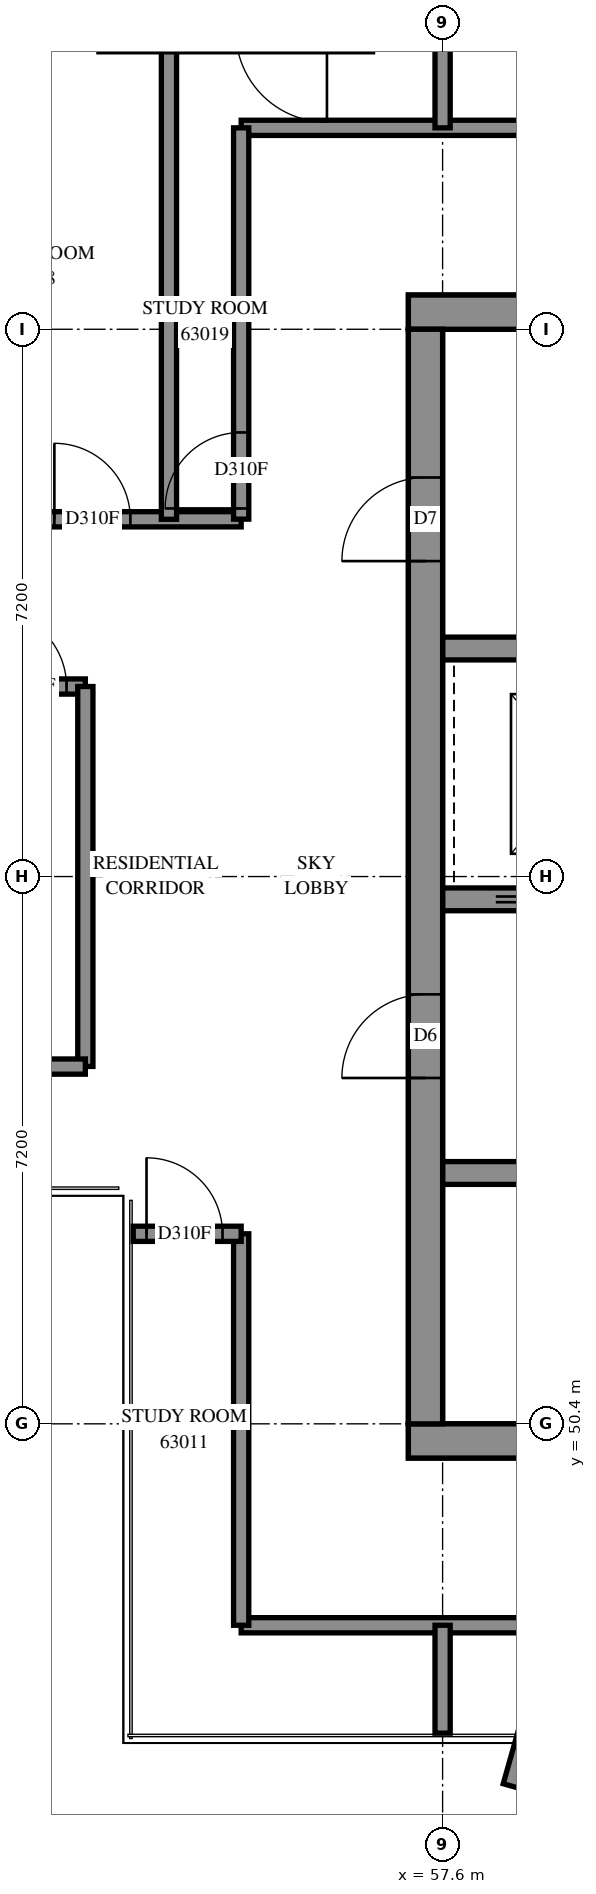
"""IFC4 building model, lengths in metres.
Left out: names, types, materials, properties, quantities, classifications, styles, units other than length and angle.
Written with IfcOpenShell. Run it as: python <this file> out.ifc"""

import sys

from ifc_helpers import new_model, si_unit, direction, frame, frame_2d, origin, place, context, subcontext, project, spatial, rectangle, extrude, element, fill, save


model = new_model("IFC4")
c1 = context("Model", 3, precision=1e-05, world=origin(), true_north=direction((0.0, 1.0)))
c2 = subcontext(c1, "Body", "Model", "MODEL_VIEW")
j1 = project(units=[si_unit("LENGTHUNIT", "METRE"), si_unit("PLANEANGLEUNIT", "RADIAN")], contexts=[c1])
p1 = place(None, origin())
s1 = spatial("IfcSite", under=j1, at=p1, CompositionType="ELEMENT")
p2 = place(p1, origin())
s2 = spatial("IfcBuilding", under=s1, at=p2, CompositionType="ELEMENT")
p3 = place(p2, frame((0.0, 0.0, 230.4)))
s3 = spatial("IfcBuildingStorey", under=s2, at=p3, CompositionType="ELEMENT", Elevation=230.4)
p4 = place(p3, frame((57.15, 50.175, -0.3), z_axis=(0.0, 0.0, 1.0), x_axis=(1.0, 0.0, 0.0)))
e1 = element("IfcWall", 1, at=p4, inside=s3, PredefinedType="SHEAR", context=c2, shape_type="SweptSolid", body=[
    extrude(rectangle(XDim=15.3, YDim=0.45, at=frame_2d((7.65, 0.0))), origin(), (0.0, 0.0, 1.0), 3.5),
])
p5 = place(p3, frame((57.15, 65.025, -0.3), z_axis=(0.0, 0.0, 1.0), x_axis=(1.0, 0.0, 0.0)))
e2 = element("IfcWall", 2, at=p5, inside=s3, PredefinedType="SHEAR", context=c2, shape_type="SweptSolid", body=[
    extrude(rectangle(XDim=15.3, YDim=0.45, at=frame_2d((7.65, 0.0))), origin(), (0.0, 0.0, 1.0), 3.5),
])
p6 = place(p5, frame((10.45, 0.0, 0.3)))
e3 = element("IfcOpeningElement", 3, at=p6, cuts=e2, PredefinedType="OPENING", context=c2, shape_type="SweptSolid", body=[
    extrude(rectangle(XDim=0.8, YDim=2.1, at=frame_2d((0.4, 1.05))), frame((0.0, 0.235, 0.0), z_axis=(0.0, -1.0, 0.0), x_axis=(1.0, 0.0, 0.0)), (0.0, 0.0, 1.0), 0.47),
])
p7 = place(p3, frame((57.375, 50.4, -0.3), z_axis=(0.0, 0.0, 1.0), x_axis=(0.0, 1.0, 0.0)))
e4 = element("IfcWall", 4, at=p7, inside=s3, PredefinedType="SHEAR", context=c2, shape_type="SweptSolid", body=[
    extrude(rectangle(XDim=14.4, YDim=0.45, at=frame_2d((7.2, 0.0))), origin(), (0.0, 0.0, 1.0), 3.5),
])
p8 = place(p7, frame((4.55, 0.0, 0.3)))
e5 = element("IfcOpeningElement", 5, at=p8, cuts=e4, PredefinedType="OPENING", context=c2, shape_type="SweptSolid", body=[
    extrude(rectangle(XDim=1.1, YDim=2.1, at=frame_2d((0.55, 1.05))), frame((0.0, 0.235, 0.0), z_axis=(0.0, -1.0, 0.0), x_axis=(1.0, 0.0, 0.0)), (0.0, 0.0, 1.0), 0.47),
])
p9 = place(p7, frame((11.35, 0.0, 0.3)))
e6 = element("IfcOpeningElement", 6, at=p9, cuts=e4, PredefinedType="OPENING", context=c2, shape_type="SweptSolid", body=[
    extrude(rectangle(XDim=1.1, YDim=2.1, at=frame_2d((0.55, 1.05))), frame((0.0, 0.235, 0.0), z_axis=(0.0, -1.0, 0.0), x_axis=(1.0, 0.0, 0.0)), (0.0, 0.0, 1.0), 0.47),
])
p10 = place(p3, frame((57.6, 53.7, 0.0), z_axis=(0.0, 0.0, 1.0), x_axis=(1.0, 0.0, 0.0)))
e7 = element("IfcWall", 7, at=p10, inside=s3, PredefinedType="SOLIDWALL", context=c2, shape_type="SweptSolid", body=[
    extrude(rectangle(XDim=14.4, YDim=0.3, at=frame_2d((7.2, 0.0))), origin(), (0.0, 0.0, 1.0), 3.9),
])
p11 = place(p10, frame((1.35, 0.0, 0.0)))
e8 = element("IfcOpeningElement", 8, at=p11, cuts=e7, PredefinedType="OPENING", context=c2, shape_type="SweptSolid", body=[
    extrude(rectangle(XDim=0.9, YDim=2.1, at=frame_2d((0.45, 1.05))), frame((0.0, 0.16, 0.0), z_axis=(0.0, -1.0, 0.0), x_axis=(1.0, 0.0, 0.0)), (0.0, 0.0, 1.0), 0.32),
])
p12 = place(p10, frame((4.95, 0.0, 0.0)))
e9 = element("IfcOpeningElement", 9, at=p12, cuts=e7, PredefinedType="OPENING", context=c2, shape_type="SweptSolid", body=[
    extrude(rectangle(XDim=0.9, YDim=2.1, at=frame_2d((0.45, 1.05))), frame((0.0, 0.16, 0.0), z_axis=(0.0, -1.0, 0.0), x_axis=(1.0, 0.0, 0.0)), (0.0, 0.0, 1.0), 0.32),
])
p13 = place(p10, frame((8.55, 0.0, 0.0)))
e10 = element("IfcOpeningElement", 10, at=p13, cuts=e7, PredefinedType="OPENING", context=c2, shape_type="SweptSolid", body=[
    extrude(rectangle(XDim=0.9, YDim=2.1, at=frame_2d((0.45, 1.05))), frame((0.0, 0.16, 0.0), z_axis=(0.0, -1.0, 0.0), x_axis=(1.0, 0.0, 0.0)), (0.0, 0.0, 1.0), 0.32),
])
p14 = place(p10, frame((12.05, 0.0, 0.0)))
e11 = element("IfcOpeningElement", 11, at=p14, cuts=e7, PredefinedType="OPENING", context=c2, shape_type="SweptSolid", body=[
    extrude(rectangle(XDim=1.1, YDim=2.1, at=frame_2d((0.55, 1.05))), frame((0.0, 0.16, 0.0), z_axis=(0.0, -1.0, 0.0), x_axis=(1.0, 0.0, 0.0)), (0.0, 0.0, 1.0), 0.32),
])
p15 = place(p3, frame((57.6, 57.3, 0.0), z_axis=(0.0, 0.0, 1.0), x_axis=(1.0, 0.0, 0.0)))
e12 = element("IfcWall", 12, at=p15, inside=s3, PredefinedType="SOLIDWALL", context=c2, shape_type="SweptSolid", body=[
    extrude(rectangle(XDim=14.4, YDim=0.3, at=frame_2d((7.2, 0.0))), origin(), (0.0, 0.0, 1.0), 3.9),
])
p16 = place(p15, frame((1.25, 0.0, 0.0)))
e13 = element("IfcOpeningElement", 13, at=p16, cuts=e12, PredefinedType="OPENING", context=c2, shape_type="SweptSolid", body=[
    extrude(rectangle(XDim=1.1, YDim=2.1, at=frame_2d((0.55, 1.05))), frame((0.0, 0.16, 0.0), z_axis=(0.0, -1.0, 0.0), x_axis=(1.0, 0.0, 0.0)), (0.0, 0.0, 1.0), 0.32),
])
p17 = place(p15, frame((4.85, 0.0, 0.0)))
e14 = element("IfcOpeningElement", 14, at=p17, cuts=e12, PredefinedType="OPENING", context=c2, shape_type="SweptSolid", body=[
    extrude(rectangle(XDim=1.1, YDim=2.1, at=frame_2d((0.55, 1.05))), frame((0.0, 0.16, 0.0), z_axis=(0.0, -1.0, 0.0), x_axis=(1.0, 0.0, 0.0)), (0.0, 0.0, 1.0), 0.32),
])
p18 = place(p15, frame((8.45, 0.0, 0.0)))
e15 = element("IfcOpeningElement", 15, at=p18, cuts=e12, PredefinedType="OPENING", context=c2, shape_type="SweptSolid", body=[
    extrude(rectangle(XDim=1.1, YDim=2.1, at=frame_2d((0.55, 1.05))), frame((0.0, 0.16, 0.0), z_axis=(0.0, -1.0, 0.0), x_axis=(1.0, 0.0, 0.0)), (0.0, 0.0, 1.0), 0.32),
])
p19 = place(p15, frame((12.05, 0.0, 0.0)))
e16 = element("IfcOpeningElement", 16, at=p19, cuts=e12, PredefinedType="OPENING", context=c2, shape_type="SweptSolid", body=[
    extrude(rectangle(XDim=1.1, YDim=2.1, at=frame_2d((0.55, 1.05))), frame((0.0, 0.16, 0.0), z_axis=(0.0, -1.0, 0.0), x_axis=(1.0, 0.0, 0.0)), (0.0, 0.0, 1.0), 0.32),
])
p20 = place(p3, frame((57.6, 60.6, 0.0), z_axis=(0.0, 0.0, 1.0), x_axis=(1.0, 0.0, 0.0)))
e17 = element("IfcWall", 17, at=p20, inside=s3, PredefinedType="SOLIDWALL", context=c2, shape_type="SweptSolid", body=[
    extrude(rectangle(XDim=7.2, YDim=0.3, at=frame_2d((3.6, 0.0))), origin(), (0.0, 0.0, 1.0), 3.9),
])
p21 = place(p3, frame((56.678, 68.725, 0.0), z_axis=(0.0, 0.0, 1.0), x_axis=(-1.0, 0.0, 0.0)))
e18 = element("IfcWall", 18, at=p21, inside=s3, PredefinedType="SOLIDWALL", context=c2, shape_type="SweptSolid", body=[
    extrude(rectangle(XDim=3.6, YDim=0.55, at=frame_2d((1.8, 0.0))), origin(), (0.0, 0.0, 1.0), 3.9),
])
p22 = place(p21, frame((0.6, 0.0, 0.0)))
e19 = element("IfcOpeningElement", 19, at=p22, cuts=e18, PredefinedType="OPENING", context=c2, shape_type="SweptSolid", body=[
    extrude(rectangle(XDim=1.2, YDim=2.4, at=frame_2d((0.6, 1.2))), frame((0.0, 0.285, 0.0), z_axis=(0.0, -1.0, 0.0), x_axis=(1.0, 0.0, 0.0)), (0.0, 0.0, 1.0), 0.57),
])
p23 = place(p3, frame((62.802, 44.835, 0.0), z_axis=(0.0, 0.0, 1.0), x_axis=(-0.962266055, 0.2721103442, 0.0)))
e20 = element("IfcWall", 20, at=p23, inside=s3, PredefinedType="SOLIDWALL", context=c2, shape_type="SweptSolid", body=[
    extrude(rectangle(XDim=4.464, YDim=0.8, at=frame_2d((2.232, 0.0))), origin(), (0.0, 0.0, 1.0), 0.65),
])
p24 = place(p3, frame((54.95, 67.45, 0.0), z_axis=(0.0, 0.0, 1.0), x_axis=(1.0, 0.0, 0.0)))
e21 = element("IfcWall", 21, at=p24, inside=s3, PredefinedType="PARTITIONING", context=c2, shape_type="SweptSolid", body=[
    extrude(rectangle(XDim=19.7, YDim=0.2, at=frame_2d((9.85, 0.0))), origin(), (0.0, 0.0, 1.0), 3.9),
])
p25 = place(p24, frame((6.513, 0.0, 0.0)))
e22 = element("IfcOpeningElement", 22, at=p25, cuts=e21, PredefinedType="OPENING", context=c2, shape_type="SweptSolid", body=[
    extrude(rectangle(XDim=1.0, YDim=2.1, at=frame_2d((0.5, 1.05))), frame((0.0, 0.11, 0.0), z_axis=(0.0, -1.0, 0.0), x_axis=(1.0, 0.0, 0.0)), (0.0, 0.0, 1.0), 0.22),
])
p26 = place(p24, frame((13.713, 0.0, 0.0)))
e23 = element("IfcOpeningElement", 23, at=p26, cuts=e21, PredefinedType="OPENING", context=c2, shape_type="SweptSolid", body=[
    extrude(rectangle(XDim=1.0, YDim=2.1, at=frame_2d((0.5, 1.05))), frame((0.0, 0.11, 0.0), z_axis=(0.0, -1.0, 0.0), x_axis=(1.0, 0.0, 0.0)), (0.0, 0.0, 1.0), 0.22),
])
p27 = place(p3, frame((54.95, 47.75, 0.0), z_axis=(0.0, 0.0, 1.0), x_axis=(1.0, 0.0, 0.0)))
e24 = element("IfcWall", 24, at=p27, inside=s3, PredefinedType="PARTITIONING", context=c2, shape_type="SweptSolid", body=[
    extrude(rectangle(XDim=19.296, YDim=0.2, at=frame_2d((9.648, 0.0))), origin(), (0.0, 0.0, 1.0), 3.9),
])
p28 = place(p27, frame((11.997, 0.0, 0.0)))
e25 = element("IfcOpeningElement", 25, at=p28, cuts=e24, PredefinedType="OPENING", context=c2, shape_type="SweptSolid", body=[
    extrude(rectangle(XDim=1.0, YDim=2.1, at=frame_2d((0.5, 1.05))), frame((0.0, 0.11, 0.0), z_axis=(0.0, -1.0, 0.0), x_axis=(1.0, 0.0, 0.0)), (0.0, 0.0, 1.0), 0.22),
])
p29 = place(p3, frame((40.702, 62.3, 0.0), z_axis=(0.0, 0.0, 1.0), x_axis=(1.0, 0.0, 0.0)))
e26 = element("IfcWall", 26, at=p29, inside=s3, PredefinedType="PARTITIONING", context=c2, shape_type="SweptSolid", body=[
    extrude(rectangle(XDim=14.248, YDim=0.2, at=frame_2d((7.124, 0.0))), origin(), (0.0, 0.0, 1.0), 3.9),
])
p30 = place(p29, frame((6.361, 0.0, 0.0)))
e27 = element("IfcOpeningElement", 27, at=p30, cuts=e26, PredefinedType="OPENING", context=c2, shape_type="SweptSolid", body=[
    extrude(rectangle(XDim=1.0, YDim=2.1, at=frame_2d((0.5, 1.05))), frame((0.0, 0.11, 0.0), z_axis=(0.0, -1.0, 0.0), x_axis=(1.0, 0.0, 0.0)), (0.0, 0.0, 1.0), 0.22),
])
p31 = place(p29, frame((11.79, 0.0, 0.0)))
e28 = element("IfcOpeningElement", 28, at=p31, cuts=e26, PredefinedType="OPENING", context=c2, shape_type="SweptSolid", body=[
    extrude(rectangle(XDim=1.0, YDim=2.1, at=frame_2d((0.5, 1.05))), frame((0.0, 0.11, 0.0), z_axis=(0.0, -1.0, 0.0), x_axis=(1.0, 0.0, 0.0)), (0.0, 0.0, 1.0), 0.22),
])
p32 = place(p3, frame((54.0, 62.3, 0.0), z_axis=(0.0, 0.0, 1.0), x_axis=(0.0, 1.0, 0.0)))
e29 = element("IfcWall", 29, at=p32, inside=s3, PredefinedType="PARTITIONING", context=c2, shape_type="SweptSolid", body=[
    extrude(rectangle(XDim=6.15, YDim=0.2, at=frame_2d((3.075, 0.0))), origin(), (0.0, 0.0, 1.0), 3.9),
])
p33 = place(p3, frame((46.33, 60.1, 0.0), z_axis=(0.0, 0.0, 1.0), x_axis=(1.0, 0.0, 0.0)))
e30 = element("IfcWall", 30, at=p33, inside=s3, PredefinedType="PARTITIONING", context=c2, shape_type="SweptSolid", body=[
    extrude(rectangle(XDim=6.57, YDim=0.2, at=frame_2d((3.285, 0.0))), origin(), (0.0, 0.0, 1.0), 3.9),
])
p34 = place(p33, frame((0.924, 0.0, 0.0)))
e31 = element("IfcOpeningElement", 31, at=p34, cuts=e30, PredefinedType="OPENING", context=c2, shape_type="SweptSolid", body=[
    extrude(rectangle(XDim=1.0, YDim=2.1, at=frame_2d((0.5, 1.05))), frame((0.0, 0.11, 0.0), z_axis=(0.0, -1.0, 0.0), x_axis=(1.0, 0.0, 0.0)), (0.0, 0.0, 1.0), 0.22),
])
p35 = place(p33, frame((5.322, 0.0, 0.0)))
e32 = element("IfcOpeningElement", 32, at=p35, cuts=e30, PredefinedType="OPENING", context=c2, shape_type="SweptSolid", body=[
    extrude(rectangle(XDim=1.0, YDim=2.1, at=frame_2d((0.5, 1.05))), frame((0.0, 0.11, 0.0), z_axis=(0.0, -1.0, 0.0), x_axis=(1.0, 0.0, 0.0)), (0.0, 0.0, 1.0), 0.22),
])
p36 = place(p3, frame((54.95, 47.75, 0.0), z_axis=(0.0, 0.0, 1.0), x_axis=(0.0, 1.0, 0.0)))
e33 = element("IfcWall", 33, at=p36, inside=s3, PredefinedType="PARTITIONING", context=c2, shape_type="SweptSolid", body=[
    extrude(rectangle(XDim=5.15, YDim=0.2, at=frame_2d((2.575, 0.0))), origin(), (0.0, 0.0, 1.0), 3.9),
])
p37 = place(p3, frame((54.95, 62.302, 0.0), z_axis=(0.0, 0.0, 1.0), x_axis=(0.0, 1.0, 0.0)))
e34 = element("IfcWall", 34, at=p37, inside=s3, PredefinedType="PARTITIONING", context=c2, shape_type="SweptSolid", body=[
    extrude(rectangle(XDim=5.148, YDim=0.2, at=frame_2d((2.574, 0.0))), origin(), (0.0, 0.0, 1.0), 3.9),
])
p38 = place(p37, frame((0.141, 0.0, 0.0)))
e35 = element("IfcOpeningElement", 35, at=p38, cuts=e34, PredefinedType="OPENING", context=c2, shape_type="SweptSolid", body=[
    extrude(rectangle(XDim=1.0, YDim=2.1, at=frame_2d((0.5, 1.05))), frame((0.0, 0.11, 0.0), z_axis=(0.0, -1.0, 0.0), x_axis=(1.0, 0.0, 0.0)), (0.0, 0.0, 1.0), 0.22),
])
p39 = place(p3, frame((52.9, 55.102, 0.0), z_axis=(0.0, 0.0, 1.0), x_axis=(0.0, 1.0, 0.0)))
e36 = element("IfcWall", 36, at=p39, inside=s3, PredefinedType="PARTITIONING", context=c2, shape_type="SweptSolid", body=[
    extrude(rectangle(XDim=4.998, YDim=0.2, at=frame_2d((2.499, 0.0))), origin(), (0.0, 0.0, 1.0), 3.9),
])
p40 = place(p3, frame((50.4, 55.1, 0.0), z_axis=(0.0, 0.0, 1.0), x_axis=(1.0, 0.0, 0.0)))
e37 = element("IfcWall", 37, at=p40, inside=s3, PredefinedType="PARTITIONING", context=c2, shape_type="SweptSolid", body=[
    extrude(rectangle(XDim=2.5, YDim=0.2, at=frame_2d((1.25, 0.0))), origin(), (0.0, 0.0, 1.0), 3.9),
])
p41 = place(p3, frame((53.53, 52.9, 0.0), z_axis=(0.0, 0.0, 1.0), x_axis=(1.0, 0.0, 0.0)))
e38 = element("IfcWall", 38, at=p41, inside=s3, PredefinedType="PARTITIONING", context=c2, shape_type="SweptSolid", body=[
    extrude(rectangle(XDim=1.42, YDim=0.2, at=frame_2d((0.71, 0.0))), origin(), (0.0, 0.0, 1.0), 3.9),
])
p42 = place(p41, frame((0.175, 0.0, 0.0)))
e39 = element("IfcOpeningElement", 39, at=p42, cuts=e38, PredefinedType="OPENING", context=c2, shape_type="SweptSolid", body=[
    extrude(rectangle(XDim=1.0, YDim=2.1, at=frame_2d((0.5, 1.05))), frame((0.0, 0.11, 0.0), z_axis=(0.0, -1.0, 0.0), x_axis=(1.0, 0.0, 0.0)), (0.0, 0.0, 1.0), 0.22),
])
for number, where, z_axis, x_axis in (
    (40, (57.6, 46.33, 0.0), (0.0, 0.0, 1.0), (0.0, 1.0, 0.0)),
    (41, (57.6, 67.45, 0.0), (0.0, 0.0, 1.0), (0.0, 1.0, 0.0)),
):
    element("IfcWall", number, at=place(p3, frame(where, z_axis=z_axis, x_axis=x_axis)), inside=s3, PredefinedType="PARTITIONING", context=c2, shape_type="SweptSolid", body=[
        extrude(rectangle(XDim=1.42, YDim=0.2, at=frame_2d((0.71, 0.0))), origin(), (0.0, 0.0, 1.0), 3.9),
    ])
p43 = place(p8, origin())
e42 = element("IfcDoor", 42, at=p43, inside=s3, OperationType="DOUBLE_DOOR_SINGLE_SWING", PredefinedType="DOOR", context=c2, shape_type="SweptSolid", body=[
    extrude(rectangle(XDim=1.1, YDim=2.1, at=frame_2d((0.55, 1.05))), frame((0.0, 0.025, 0.0), z_axis=(0.0, -1.0, 0.0), x_axis=(1.0, 0.0, 0.0)), (0.0, 0.0, 1.0), 0.05),
])
fill(e5, e42)
p44 = place(p9, origin())
e43 = element("IfcDoor", 43, at=p44, inside=s3, OperationType="SINGLE_SWING_LEFT", PredefinedType="DOOR", context=c2, shape_type="SweptSolid", body=[
    extrude(rectangle(XDim=1.1, YDim=2.1, at=frame_2d((0.55, 1.05))), frame((0.0, 0.025, 0.0), z_axis=(0.0, -1.0, 0.0), x_axis=(1.0, 0.0, 0.0)), (0.0, 0.0, 1.0), 0.05),
])
fill(e6, e43)
p45 = place(p42, origin())
e44 = element("IfcDoor", 44, at=p45, inside=s3, OperationType="SINGLE_SWING_RIGHT", PredefinedType="DOOR", context=c2, shape_type="SweptSolid", body=[
    extrude(rectangle(XDim=1.0, YDim=2.1, at=frame_2d((0.5, 1.05))), frame((0.0, 0.025, 0.0), z_axis=(0.0, -1.0, 0.0), x_axis=(1.0, 0.0, 0.0)), (0.0, 0.0, 1.0), 0.05),
])
fill(e39, e44)
p46 = place(p35, origin())
e45 = element("IfcDoor", 45, at=p46, inside=s3, OperationType="SINGLE_SWING_LEFT", PredefinedType="DOOR", context=c2, shape_type="SweptSolid", body=[
    extrude(rectangle(XDim=1.0, YDim=2.1, at=frame_2d((0.5, 1.05))), frame((0.0, 0.025, 0.0), z_axis=(0.0, -1.0, 0.0), x_axis=(1.0, 0.0, 0.0)), (0.0, 0.0, 1.0), 0.05),
])
fill(e32, e45)
p47 = place(p31, origin())
e46 = element("IfcDoor", 46, at=p47, inside=s3, OperationType="SINGLE_SWING_RIGHT", PredefinedType="DOOR", context=c2, shape_type="SweptSolid", body=[
    extrude(rectangle(XDim=1.0, YDim=2.1, at=frame_2d((0.5, 1.05))), frame((0.0, 0.025, 0.0), z_axis=(0.0, -1.0, 0.0), x_axis=(1.0, 0.0, 0.0)), (0.0, 0.0, 1.0), 0.05),
])
fill(e28, e46)
p48 = place(p38, origin())
e47 = element("IfcDoor", 47, at=p48, inside=s3, OperationType="SINGLE_SWING_LEFT", PredefinedType="DOOR", context=c2, shape_type="SweptSolid", body=[
    extrude(rectangle(XDim=1.0, YDim=2.1, at=frame_2d((0.5, 1.05))), frame((0.0, 0.025, 0.0), z_axis=(0.0, -1.0, 0.0), x_axis=(1.0, 0.0, 0.0)), (0.0, 0.0, 1.0), 0.05),
])
fill(e35, e47)
save(model, sys.argv[1])
